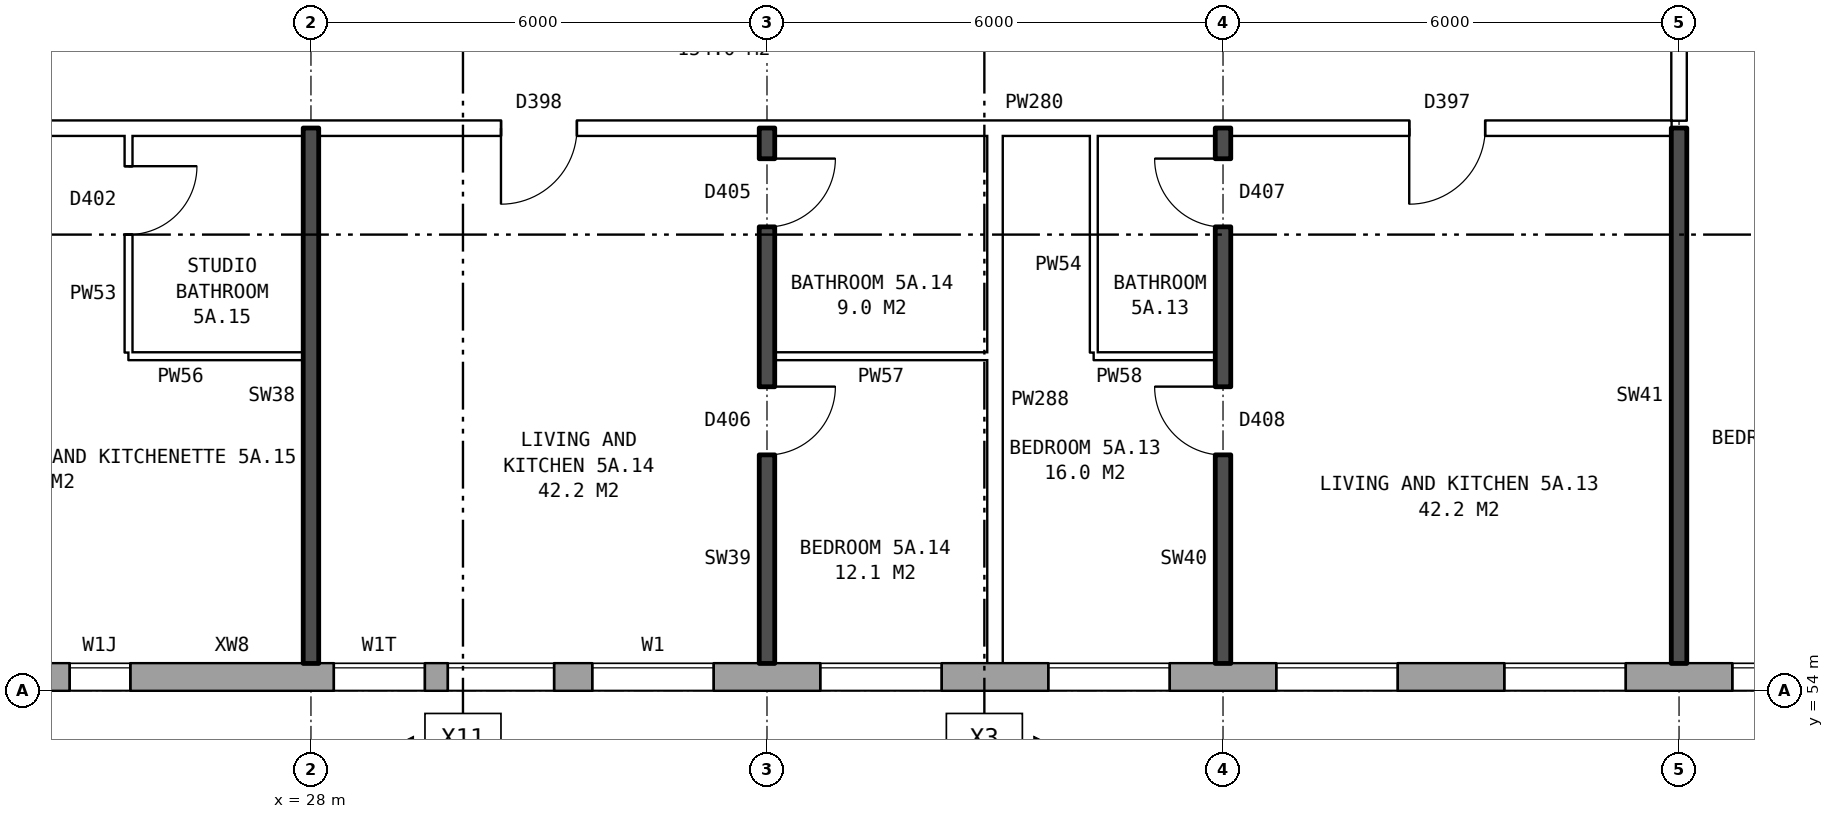
"""IFC4 building model, lengths in metres.
Left out: names, types, materials, properties, quantities, classifications, styles, units other than length and angle.
Written with IfcOpenShell. Run it as: python <this file> out.ifc"""

import sys

from ifc_helpers import new_model, si_unit, direction, frame, frame_2d, origin, place, context, subcontext, project, spatial, rectangle, extrude, element, fill, save


model = new_model("IFC4")
c1 = context("Model", 3, precision=1e-05, world=origin(), true_north=direction((0.0, 1.0)))
c2 = subcontext(c1, "Body", "Model", "MODEL_VIEW")
j1 = project(units=[si_unit("LENGTHUNIT", "METRE"), si_unit("PLANEANGLEUNIT", "RADIAN")], contexts=[c1])
p1 = place(None, origin())
s1 = spatial("IfcSite", under=j1, at=p1, CompositionType="ELEMENT")
p2 = place(p1, origin())
s2 = spatial("IfcBuilding", under=s1, at=p2, CompositionType="ELEMENT")
p3 = place(p2, frame((0.0, 0.0, 22.6)))
s3 = spatial("IfcBuildingStorey", under=s2, at=p3, CompositionType="ELEMENT", Elevation=22.6)
p4 = place(p3, frame((22.825, 54.18, 0.0), z_axis=(0.0, 0.0, 1.0), x_axis=(1.0, 0.0, 0.0)))
e1 = element("IfcWall", 1, at=p4, inside=s3, PredefinedType="STANDARD", context=c2, shape_type="SweptSolid", body=[
    extrude(rectangle(XDim=50.101, YDim=0.36, at=frame_2d((25.05, 0.0))), origin(), (0.0, 0.0, 1.0), 2.85),
])
p5 = place(p4, frame((0.3, 0.0, 0.8)))
e2 = element("IfcOpeningElement", 2, at=p5, cuts=e1, PredefinedType="OPENING", context=c2, shape_type="SweptSolid", body=[
    extrude(rectangle(XDim=1.4, YDim=1.8, at=frame_2d((0.7, 0.9))), frame((0.0, 0.19, 0.0), z_axis=(0.0, -1.0, 0.0), x_axis=(1.0, 0.0, 0.0)), (0.0, 0.0, 1.0), 0.38),
])
p6 = place(p4, frame((5.475, 0.0, 0.8)))
e3 = element("IfcOpeningElement", 3, at=p6, cuts=e1, PredefinedType="OPENING", context=c2, shape_type="SweptSolid", body=[
    extrude(rectangle(XDim=1.2, YDim=0.9, at=frame_2d((0.6, 0.45))), frame((0.0, 0.19, 0.0), z_axis=(0.0, -1.0, 0.0), x_axis=(1.0, 0.0, 0.0)), (0.0, 0.0, 1.0), 0.38),
])
p7 = place(p4, frame((8.875, 0.0, 0.8)))
e4 = element("IfcOpeningElement", 4, at=p7, cuts=e1, PredefinedType="OPENING", context=c2, shape_type="SweptSolid", body=[
    extrude(rectangle(XDim=1.6, YDim=1.8, at=frame_2d((0.8, 0.9))), frame((0.0, 0.19, 0.0), z_axis=(0.0, -1.0, 0.0), x_axis=(1.0, 0.0, 0.0)), (0.0, 0.0, 1.0), 0.38),
])
p8 = place(p4, frame((11.875, 0.0, 0.8)))
e5 = element("IfcOpeningElement", 5, at=p8, cuts=e1, PredefinedType="OPENING", context=c2, shape_type="SweptSolid", body=[
    extrude(rectangle(XDim=1.6, YDim=1.8, at=frame_2d((0.8, 0.9))), frame((0.0, 0.19, 0.0), z_axis=(0.0, -1.0, 0.0), x_axis=(1.0, 0.0, 0.0)), (0.0, 0.0, 1.0), 0.38),
])
p9 = place(p4, frame((14.875, 0.0, 0.8)))
e6 = element("IfcOpeningElement", 6, at=p9, cuts=e1, PredefinedType="OPENING", context=c2, shape_type="SweptSolid", body=[
    extrude(rectangle(XDim=1.6, YDim=1.8, at=frame_2d((0.8, 0.9))), frame((0.0, 0.19, 0.0), z_axis=(0.0, -1.0, 0.0), x_axis=(1.0, 0.0, 0.0)), (0.0, 0.0, 1.0), 0.38),
])
p10 = place(p4, frame((17.875, 0.0, 0.8)))
e7 = element("IfcOpeningElement", 7, at=p10, cuts=e1, PredefinedType="OPENING", context=c2, shape_type="SweptSolid", body=[
    extrude(rectangle(XDim=1.6, YDim=1.8, at=frame_2d((0.8, 0.9))), frame((0.0, 0.19, 0.0), z_axis=(0.0, -1.0, 0.0), x_axis=(1.0, 0.0, 0.0)), (0.0, 0.0, 1.0), 0.38),
])
p11 = place(p4, frame((20.875, 0.0, 0.8)))
e8 = element("IfcOpeningElement", 8, at=p11, cuts=e1, PredefinedType="OPENING", context=c2, shape_type="SweptSolid", body=[
    extrude(rectangle(XDim=1.6, YDim=1.8, at=frame_2d((0.8, 0.9))), frame((0.0, 0.19, 0.0), z_axis=(0.0, -1.0, 0.0), x_axis=(1.0, 0.0, 0.0)), (0.0, 0.0, 1.0), 0.38),
])
p12 = place(p4, frame((23.875, 0.0, 0.8)))
e9 = element("IfcOpeningElement", 9, at=p12, cuts=e1, PredefinedType="OPENING", context=c2, shape_type="SweptSolid", body=[
    extrude(rectangle(XDim=1.6, YDim=1.8, at=frame_2d((0.8, 0.9))), frame((0.0, 0.19, 0.0), z_axis=(0.0, -1.0, 0.0), x_axis=(1.0, 0.0, 0.0)), (0.0, 0.0, 1.0), 0.38),
])
p13 = place(p4, frame((26.875, 0.0, 0.8)))
e10 = element("IfcOpeningElement", 10, at=p13, cuts=e1, PredefinedType="OPENING", context=c2, shape_type="SweptSolid", body=[
    extrude(rectangle(XDim=1.6, YDim=1.8, at=frame_2d((0.8, 0.9))), frame((0.0, 0.19, 0.0), z_axis=(0.0, -1.0, 0.0), x_axis=(1.0, 0.0, 0.0)), (0.0, 0.0, 1.0), 0.38),
])
p14 = place(p4, frame((29.875, 0.0, 0.8)))
e11 = element("IfcOpeningElement", 11, at=p14, cuts=e1, PredefinedType="OPENING", context=c2, shape_type="SweptSolid", body=[
    extrude(rectangle(XDim=1.6, YDim=1.8, at=frame_2d((0.8, 0.9))), frame((0.0, 0.19, 0.0), z_axis=(0.0, -1.0, 0.0), x_axis=(1.0, 0.0, 0.0)), (0.0, 0.0, 1.0), 0.38),
])
p15 = place(p4, frame((32.875, 0.0, 0.8)))
e12 = element("IfcOpeningElement", 12, at=p15, cuts=e1, PredefinedType="OPENING", context=c2, shape_type="SweptSolid", body=[
    extrude(rectangle(XDim=1.6, YDim=1.8, at=frame_2d((0.8, 0.9))), frame((0.0, 0.19, 0.0), z_axis=(0.0, -1.0, 0.0), x_axis=(1.0, 0.0, 0.0)), (0.0, 0.0, 1.0), 0.38),
])
p16 = place(p4, frame((35.875, 0.0, 0.8)))
e13 = element("IfcOpeningElement", 13, at=p16, cuts=e1, PredefinedType="OPENING", context=c2, shape_type="SweptSolid", body=[
    extrude(rectangle(XDim=1.6, YDim=1.8, at=frame_2d((0.8, 0.9))), frame((0.0, 0.19, 0.0), z_axis=(0.0, -1.0, 0.0), x_axis=(1.0, 0.0, 0.0)), (0.0, 0.0, 1.0), 0.38),
])
p17 = place(p4, frame((38.875, 0.0, 0.8)))
e14 = element("IfcOpeningElement", 14, at=p17, cuts=e1, PredefinedType="OPENING", context=c2, shape_type="SweptSolid", body=[
    extrude(rectangle(XDim=1.6, YDim=1.8, at=frame_2d((0.8, 0.9))), frame((0.0, 0.19, 0.0), z_axis=(0.0, -1.0, 0.0), x_axis=(1.0, 0.0, 0.0)), (0.0, 0.0, 1.0), 0.38),
])
p18 = place(p4, frame((41.875, 0.0, 0.8)))
e15 = element("IfcOpeningElement", 15, at=p18, cuts=e1, PredefinedType="OPENING", context=c2, shape_type="SweptSolid", body=[
    extrude(rectangle(XDim=1.6, YDim=1.8, at=frame_2d((0.8, 0.9))), frame((0.0, 0.19, 0.0), z_axis=(0.0, -1.0, 0.0), x_axis=(1.0, 0.0, 0.0)), (0.0, 0.0, 1.0), 0.38),
])
p19 = place(p4, frame((43.775, 0.0, 0.8)))
e16 = element("IfcOpeningElement", 16, at=p19, cuts=e1, PredefinedType="OPENING", context=c2, shape_type="SweptSolid", body=[
    extrude(rectangle(XDim=0.8, YDim=0.9, at=frame_2d((0.4, 0.45))), frame((0.0, 0.19, 0.0), z_axis=(0.0, -1.0, 0.0), x_axis=(1.0, 0.0, 0.0)), (0.0, 0.0, 1.0), 0.38),
])
p20 = place(p4, frame((47.875, 0.0, 0.8)))
e17 = element("IfcOpeningElement", 17, at=p20, cuts=e1, PredefinedType="OPENING", context=c2, shape_type="SweptSolid", body=[
    extrude(rectangle(XDim=1.6, YDim=1.8, at=frame_2d((0.8, 0.9))), frame((0.0, 0.19, 0.0), z_axis=(0.0, -1.0, 0.0), x_axis=(1.0, 0.0, 0.0)), (0.0, 0.0, 1.0), 0.38),
])
p21 = place(p4, frame((2.0, 0.0, 0.9)))
e18 = element("IfcOpeningElement", 18, at=p21, cuts=e1, PredefinedType="OPENING", context=c2, shape_type="SweptSolid", body=[
    extrude(rectangle(XDim=0.8, YDim=1.5, at=frame_2d((0.4, 0.75))), frame((0.0, 0.19, 0.0), z_axis=(0.0, -1.0, 0.0), x_axis=(1.0, 0.0, 0.0)), (0.0, 0.0, 1.0), 0.38),
])
p22 = place(p4, frame((6.975, 0.0, 0.8)))
e19 = element("IfcOpeningElement", 19, at=p22, cuts=e1, PredefinedType="OPENING", context=c2, shape_type="SweptSolid", body=[
    extrude(rectangle(XDim=1.4, YDim=1.8, at=frame_2d((0.7, 0.9))), frame((0.0, 0.19, 0.0), z_axis=(0.0, -1.0, 0.0), x_axis=(1.0, 0.0, 0.0)), (0.0, 0.0, 1.0), 0.38),
])
p23 = place(p4, frame((46.075, 0.0, 1.7)))
e20 = element("IfcOpeningElement", 20, at=p23, cuts=e1, PredefinedType="OPENING", context=c2, shape_type="SweptSolid", body=[
    extrude(rectangle(XDim=0.8, YDim=0.9, at=frame_2d((0.4, 0.45))), frame((0.0, 0.19, 0.0), z_axis=(0.0, -1.0, 0.0), x_axis=(1.0, 0.0, 0.0)), (0.0, 0.0, 1.0), 0.38),
])
p24 = place(p3, frame((25.6, 58.4, 0.0), z_axis=(0.0, 0.0, 1.0), x_axis=(1.0, 0.0, 0.0)))
e21 = element("IfcWall", 21, at=p24, inside=s3, PredefinedType="PARTITIONING", context=c2, shape_type="SweptSolid", body=[
    extrude(rectangle(XDim=2.3, YDim=0.1, at=frame_2d((1.15, 0.0))), origin(), (0.0, 0.0, 1.0), 2.85),
])
p25 = place(p3, frame((34.1, 58.4, 0.0), z_axis=(0.0, 0.0, 1.0), x_axis=(1.0, 0.0, 0.0)))
e22 = element("IfcWall", 22, at=p25, inside=s3, PredefinedType="PARTITIONING", context=c2, shape_type="SweptSolid", body=[
    extrude(rectangle(XDim=2.8, YDim=0.1, at=frame_2d((1.4, 0.0))), origin(), (0.0, 0.0, 1.0), 2.85),
])
p26 = place(p3, frame((38.3, 58.4, 0.0), z_axis=(0.0, 0.0, 1.0), x_axis=(1.0, 0.0, 0.0)))
e23 = element("IfcWall", 23, at=p26, inside=s3, PredefinedType="PARTITIONING", context=c2, shape_type="SweptSolid", body=[
    extrude(rectangle(XDim=1.6, YDim=0.1, at=frame_2d((0.8, 0.0))), origin(), (0.0, 0.0, 1.0), 2.85),
])
p27 = place(p3, frame((20.11, 61.4, 0.0), z_axis=(0.0, 0.0, 1.0), x_axis=(1.0, 0.0, 0.0)))
e24 = element("IfcWall", 24, at=p27, inside=s3, PredefinedType="PARTITIONING", context=c2, shape_type="SweptSolid", body=[
    extrude(rectangle(XDim=25.79, YDim=0.2, at=frame_2d((12.895, 0.0))), origin(), (0.0, 0.0, 1.0), 2.85),
])
p28 = place(p27, frame((22.34, 0.0, 0.0)))
e25 = element("IfcOpeningElement", 25, at=p28, cuts=e24, PredefinedType="OPENING", context=c2, shape_type="SweptSolid", body=[
    extrude(rectangle(XDim=1.0, YDim=2.1, at=frame_2d((0.5, 1.05))), frame((0.0, 0.11, 0.0), z_axis=(0.0, -1.0, 0.0), x_axis=(1.0, 0.0, 0.0)), (0.0, 0.0, 1.0), 0.22),
])
p29 = place(p27, frame((10.39, 0.0, 0.0)))
e26 = element("IfcOpeningElement", 26, at=p29, cuts=e24, PredefinedType="OPENING", context=c2, shape_type="SweptSolid", body=[
    extrude(rectangle(XDim=1.0, YDim=2.1, at=frame_2d((0.5, 1.05))), frame((0.0, 0.11, 0.0), z_axis=(0.0, -1.0, 0.0), x_axis=(1.0, 0.0, 0.0)), (0.0, 0.0, 1.0), 0.22),
])
p30 = place(p27, frame((2.245, 0.0, 0.0)))
e27 = element("IfcOpeningElement", 27, at=p30, cuts=e24, PredefinedType="OPENING", context=c2, shape_type="SweptSolid", body=[
    extrude(rectangle(XDim=1.0, YDim=2.1, at=frame_2d((0.5, 1.05))), frame((0.0, 0.11, 0.0), z_axis=(0.0, -1.0, 0.0), x_axis=(1.0, 0.0, 0.0)), (0.0, 0.0, 1.0), 0.22),
])
p31 = place(p3, frame((25.6, 58.45, 0.0), z_axis=(0.0, 0.0, 1.0), x_axis=(0.0, 1.0, 0.0)))
e28 = element("IfcWall", 28, at=p31, inside=s3, PredefinedType="PARTITIONING", context=c2, shape_type="SweptSolid", body=[
    extrude(rectangle(XDim=2.85, YDim=0.1, at=frame_2d((1.425, 0.0))), origin(), (0.0, 0.0, 1.0), 2.85),
])
p32 = place(p31, frame((1.55, 0.0, 0.0)))
e29 = element("IfcOpeningElement", 29, at=p32, cuts=e28, PredefinedType="OPENING", context=c2, shape_type="SweptSolid", body=[
    extrude(rectangle(XDim=0.9, YDim=2.1, at=frame_2d((0.45, 1.05))), frame((0.0, 0.06, 0.0), z_axis=(0.0, -1.0, 0.0), x_axis=(1.0, 0.0, 0.0)), (0.0, 0.0, 1.0), 0.12),
])
p33 = place(p3, frame((28.0, 54.36, 0.0), z_axis=(0.0, 0.0, 1.0), x_axis=(0.0, 1.0, 0.0)))
e30 = element("IfcWall", 30, at=p33, inside=s3, PredefinedType="SOLIDWALL", context=c2, shape_type="SweptSolid", body=[
    extrude(rectangle(XDim=7.04, YDim=0.2, at=frame_2d((3.52, 0.0))), origin(), (0.0, 0.0, 1.0), 2.85),
])
p34 = place(p3, frame((34.0, 54.36, 0.0), z_axis=(0.0, 0.0, 1.0), x_axis=(0.0, 1.0, 0.0)))
e31 = element("IfcWall", 31, at=p34, inside=s3, PredefinedType="SOLIDWALL", context=c2, shape_type="SweptSolid", body=[
    extrude(rectangle(XDim=7.04, YDim=0.2, at=frame_2d((3.52, 0.0))), origin(), (0.0, 0.0, 1.0), 2.85),
])
p35 = place(p34, frame((2.74, 0.0, 0.0)))
e32 = element("IfcOpeningElement", 32, at=p35, cuts=e31, PredefinedType="OPENING", context=c2, shape_type="SweptSolid", body=[
    extrude(rectangle(XDim=0.9, YDim=2.1, at=frame_2d((0.45, 1.05))), frame((0.0, 0.11, 0.0), z_axis=(0.0, -1.0, 0.0), x_axis=(1.0, 0.0, 0.0)), (0.0, 0.0, 1.0), 0.22),
])
p36 = place(p34, frame((5.74, 0.0, 0.0)))
e33 = element("IfcOpeningElement", 33, at=p36, cuts=e31, PredefinedType="OPENING", context=c2, shape_type="SweptSolid", body=[
    extrude(rectangle(XDim=0.9, YDim=2.1, at=frame_2d((0.45, 1.05))), frame((0.0, 0.11, 0.0), z_axis=(0.0, -1.0, 0.0), x_axis=(1.0, 0.0, 0.0)), (0.0, 0.0, 1.0), 0.22),
])
p37 = place(p3, frame((37.0, 54.36, 0.0), z_axis=(0.0, 0.0, 1.0), x_axis=(0.0, 1.0, 0.0)))
e34 = element("IfcWall", 34, at=p37, inside=s3, PredefinedType="PARTITIONING", context=c2, shape_type="SweptSolid", body=[
    extrude(rectangle(XDim=6.94, YDim=0.2, at=frame_2d((3.47, 0.0))), origin(), (0.0, 0.0, 1.0), 2.85),
])
p38 = place(p3, frame((38.3, 58.45, 0.0), z_axis=(0.0, 0.0, 1.0), x_axis=(0.0, 1.0, 0.0)))
e35 = element("IfcWall", 35, at=p38, inside=s3, PredefinedType="PARTITIONING", context=c2, shape_type="SweptSolid", body=[
    extrude(rectangle(XDim=2.85, YDim=0.1, at=frame_2d((1.425, 0.0))), origin(), (0.0, 0.0, 1.0), 2.85),
])
p39 = place(p3, frame((40.0, 54.36, 0.0), z_axis=(0.0, 0.0, 1.0), x_axis=(0.0, 1.0, 0.0)))
e36 = element("IfcWall", 36, at=p39, inside=s3, PredefinedType="SOLIDWALL", context=c2, shape_type="SweptSolid", body=[
    extrude(rectangle(XDim=7.04, YDim=0.2, at=frame_2d((3.52, 0.0))), origin(), (0.0, 0.0, 1.0), 2.85),
])
p40 = place(p39, frame((2.74, 0.0, 0.0)))
e37 = element("IfcOpeningElement", 37, at=p40, cuts=e36, PredefinedType="OPENING", context=c2, shape_type="SweptSolid", body=[
    extrude(rectangle(XDim=0.9, YDim=2.1, at=frame_2d((0.45, 1.05))), frame((0.0, 0.11, 0.0), z_axis=(0.0, -1.0, 0.0), x_axis=(1.0, 0.0, 0.0)), (0.0, 0.0, 1.0), 0.22),
])
p41 = place(p39, frame((5.74, 0.0, 0.0)))
e38 = element("IfcOpeningElement", 38, at=p41, cuts=e36, PredefinedType="OPENING", context=c2, shape_type="SweptSolid", body=[
    extrude(rectangle(XDim=0.9, YDim=2.1, at=frame_2d((0.45, 1.05))), frame((0.0, 0.11, 0.0), z_axis=(0.0, -1.0, 0.0), x_axis=(1.0, 0.0, 0.0)), (0.0, 0.0, 1.0), 0.22),
])
p42 = place(p3, frame((46.0, 54.36, 0.0), z_axis=(0.0, 0.0, 1.0), x_axis=(0.0, 1.0, 0.0)))
e39 = element("IfcWall", 39, at=p42, inside=s3, PredefinedType="SOLIDWALL", context=c2, shape_type="SweptSolid", body=[
    extrude(rectangle(XDim=7.04, YDim=0.2, at=frame_2d((3.52, 0.0))), origin(), (0.0, 0.0, 1.0), 2.85),
])
p43 = place(p3, frame((46.0, 61.5, 0.0), z_axis=(0.0, 0.0, 1.0), x_axis=(0.0, 1.0, 0.0)))
e40 = element("IfcWall", 40, at=p43, inside=s3, PredefinedType="PARTITIONING", context=c2, shape_type="SweptSolid", body=[
    extrude(rectangle(XDim=2.2, YDim=0.2, at=frame_2d((1.1, 0.0))), origin(), (0.0, 0.0, 1.0), 2.85),
])
p44 = place(p6, origin())
e41 = element("IfcWindow", 41, at=p44, inside=s3, PartitioningType="SINGLE_PANEL", PredefinedType="WINDOW", context=c2, shape_type="SweptSolid", body=[
    extrude(rectangle(XDim=1.2, YDim=0.9, at=frame_2d((0.6, 0.45))), frame((0.0, 0.15, 0.0), z_axis=(0.0, -1.0, 0.0), x_axis=(1.0, 0.0, 0.0)), (0.0, 0.0, 1.0), 0.06),
])
fill(e3, e41)
p45 = place(p7, origin())
e42 = element("IfcWindow", 42, at=p45, inside=s3, PartitioningType="SINGLE_PANEL", PredefinedType="WINDOW", context=c2, shape_type="SweptSolid", body=[
    extrude(rectangle(XDim=1.6, YDim=1.8, at=frame_2d((0.8, 0.9))), frame((0.0, 0.15, 0.0), z_axis=(0.0, -1.0, 0.0), x_axis=(1.0, 0.0, 0.0)), (0.0, 0.0, 1.0), 0.06),
])
fill(e4, e42)
p46 = place(p8, origin())
e43 = element("IfcWindow", 43, at=p46, inside=s3, PartitioningType="SINGLE_PANEL", PredefinedType="WINDOW", context=c2, shape_type="SweptSolid", body=[
    extrude(rectangle(XDim=1.6, YDim=1.8, at=frame_2d((0.8, 0.9))), frame((0.0, 0.15, 0.0), z_axis=(0.0, -1.0, 0.0), x_axis=(1.0, 0.0, 0.0)), (0.0, 0.0, 1.0), 0.06),
])
fill(e5, e43)
p47 = place(p9, origin())
e44 = element("IfcWindow", 44, at=p47, inside=s3, PartitioningType="SINGLE_PANEL", PredefinedType="WINDOW", context=c2, shape_type="SweptSolid", body=[
    extrude(rectangle(XDim=1.6, YDim=1.8, at=frame_2d((0.8, 0.9))), frame((0.0, 0.15, 0.0), z_axis=(0.0, -1.0, 0.0), x_axis=(1.0, 0.0, 0.0)), (0.0, 0.0, 1.0), 0.06),
])
fill(e6, e44)
p48 = place(p10, origin())
e45 = element("IfcWindow", 45, at=p48, inside=s3, PartitioningType="SINGLE_PANEL", PredefinedType="WINDOW", context=c2, shape_type="SweptSolid", body=[
    extrude(rectangle(XDim=1.6, YDim=1.8, at=frame_2d((0.8, 0.9))), frame((0.0, 0.15, 0.0), z_axis=(0.0, -1.0, 0.0), x_axis=(1.0, 0.0, 0.0)), (0.0, 0.0, 1.0), 0.06),
])
fill(e7, e45)
p49 = place(p11, origin())
e46 = element("IfcWindow", 46, at=p49, inside=s3, PartitioningType="SINGLE_PANEL", PredefinedType="WINDOW", context=c2, shape_type="SweptSolid", body=[
    extrude(rectangle(XDim=1.6, YDim=1.8, at=frame_2d((0.8, 0.9))), frame((0.0, 0.15, 0.0), z_axis=(0.0, -1.0, 0.0), x_axis=(1.0, 0.0, 0.0)), (0.0, 0.0, 1.0), 0.06),
])
fill(e8, e46)
p50 = place(p12, origin())
e47 = element("IfcWindow", 47, at=p50, inside=s3, PartitioningType="SINGLE_PANEL", PredefinedType="WINDOW", context=c2, shape_type="SweptSolid", body=[
    extrude(rectangle(XDim=1.6, YDim=1.8, at=frame_2d((0.8, 0.9))), frame((0.0, 0.15, 0.0), z_axis=(0.0, -1.0, 0.0), x_axis=(1.0, 0.0, 0.0)), (0.0, 0.0, 1.0), 0.06),
])
fill(e9, e47)
p51 = place(p40, origin())
e48 = element("IfcDoor", 48, at=p51, inside=s3, OperationType="SINGLE_SWING_RIGHT", PredefinedType="DOOR", context=c2, shape_type="SweptSolid", body=[
    extrude(rectangle(XDim=0.9, YDim=2.1, at=frame_2d((0.45, 1.05))), frame((0.0, 0.025, 0.0), z_axis=(0.0, -1.0, 0.0), x_axis=(1.0, 0.0, 0.0)), (0.0, 0.0, 1.0), 0.05),
])
fill(e37, e48)
p52 = place(p28, frame((1.0, 0.0, 0.0), z_axis=(0.0, 0.0, 1.0), x_axis=(-1.0, 0.0, 0.0)))
e49 = element("IfcDoor", 49, at=p52, inside=s3, OperationType="SINGLE_SWING_RIGHT", PredefinedType="DOOR", context=c2, shape_type="SweptSolid", body=[
    extrude(rectangle(XDim=1.0, YDim=2.1, at=frame_2d((0.5, 1.05))), frame((0.0, 0.025, 0.0), z_axis=(0.0, -1.0, 0.0), x_axis=(1.0, 0.0, 0.0)), (0.0, 0.0, 1.0), 0.05),
])
fill(e25, e49)
p53 = place(p41, origin())
e50 = element("IfcDoor", 50, at=p53, inside=s3, OperationType="SINGLE_SWING_RIGHT", PredefinedType="DOOR", context=c2, shape_type="SweptSolid", body=[
    extrude(rectangle(XDim=0.9, YDim=2.1, at=frame_2d((0.45, 1.05))), frame((0.0, 0.025, 0.0), z_axis=(0.0, -1.0, 0.0), x_axis=(1.0, 0.0, 0.0)), (0.0, 0.0, 1.0), 0.05),
])
fill(e38, e50)
p54 = place(p35, frame((0.9, 0.0, 0.0), z_axis=(0.0, 0.0, 1.0), x_axis=(-1.0, 0.0, 0.0)))
e51 = element("IfcDoor", 51, at=p54, inside=s3, OperationType="SINGLE_SWING_LEFT", PredefinedType="DOOR", context=c2, shape_type="SweptSolid", body=[
    extrude(rectangle(XDim=0.9, YDim=2.1, at=frame_2d((0.45, 1.05))), frame((0.0, 0.025, 0.0), z_axis=(0.0, -1.0, 0.0), x_axis=(1.0, 0.0, 0.0)), (0.0, 0.0, 1.0), 0.05),
])
fill(e32, e51)
p55 = place(p29, frame((1.0, 0.0, 0.0), z_axis=(0.0, 0.0, 1.0), x_axis=(-1.0, 0.0, 0.0)))
e52 = element("IfcDoor", 52, at=p55, inside=s3, OperationType="SINGLE_SWING_RIGHT", PredefinedType="DOOR", context=c2, shape_type="SweptSolid", body=[
    extrude(rectangle(XDim=1.0, YDim=2.1, at=frame_2d((0.5, 1.05))), frame((0.0, 0.025, 0.0), z_axis=(0.0, -1.0, 0.0), x_axis=(1.0, 0.0, 0.0)), (0.0, 0.0, 1.0), 0.05),
])
fill(e26, e52)
p56 = place(p36, frame((0.9, 0.0, 0.0), z_axis=(0.0, 0.0, 1.0), x_axis=(-1.0, 0.0, 0.0)))
e53 = element("IfcDoor", 53, at=p56, inside=s3, OperationType="SINGLE_SWING_LEFT", PredefinedType="DOOR", context=c2, shape_type="SweptSolid", body=[
    extrude(rectangle(XDim=0.9, YDim=2.1, at=frame_2d((0.45, 1.05))), frame((0.0, 0.025, 0.0), z_axis=(0.0, -1.0, 0.0), x_axis=(1.0, 0.0, 0.0)), (0.0, 0.0, 1.0), 0.05),
])
fill(e33, e53)
p57 = place(p32, frame((0.9, 0.0, 0.0), z_axis=(0.0, 0.0, 1.0), x_axis=(-1.0, 0.0, 0.0)))
e54 = element("IfcDoor", 54, at=p57, inside=s3, OperationType="SINGLE_SWING_LEFT", PredefinedType="DOOR", context=c2, shape_type="SweptSolid", body=[
    extrude(rectangle(XDim=0.9, YDim=2.1, at=frame_2d((0.45, 1.05))), frame((0.0, 0.025, 0.0), z_axis=(0.0, -1.0, 0.0), x_axis=(1.0, 0.0, 0.0)), (0.0, 0.0, 1.0), 0.05),
])
fill(e29, e54)
p58 = place(p21, origin())
e55 = element("IfcWindow", 55, at=p58, inside=s3, PartitioningType="SINGLE_PANEL", PredefinedType="WINDOW", context=c2, shape_type="SweptSolid", body=[
    extrude(rectangle(XDim=0.8, YDim=1.5, at=frame_2d((0.4, 0.75))), frame((0.0, 0.15, 0.0), z_axis=(0.0, -1.0, 0.0), x_axis=(1.0, 0.0, 0.0)), (0.0, 0.0, 1.0), 0.06),
])
fill(e18, e55)
p59 = place(p22, origin())
e56 = element("IfcWindow", 56, at=p59, inside=s3, PartitioningType="SINGLE_PANEL", PredefinedType="WINDOW", context=c2, shape_type="SweptSolid", body=[
    extrude(rectangle(XDim=1.4, YDim=1.8, at=frame_2d((0.7, 0.9))), frame((0.0, 0.15, 0.0), z_axis=(0.0, -1.0, 0.0), x_axis=(1.0, 0.0, 0.0)), (0.0, 0.0, 1.0), 0.06),
])
fill(e19, e56)
save(model, sys.argv[1])
